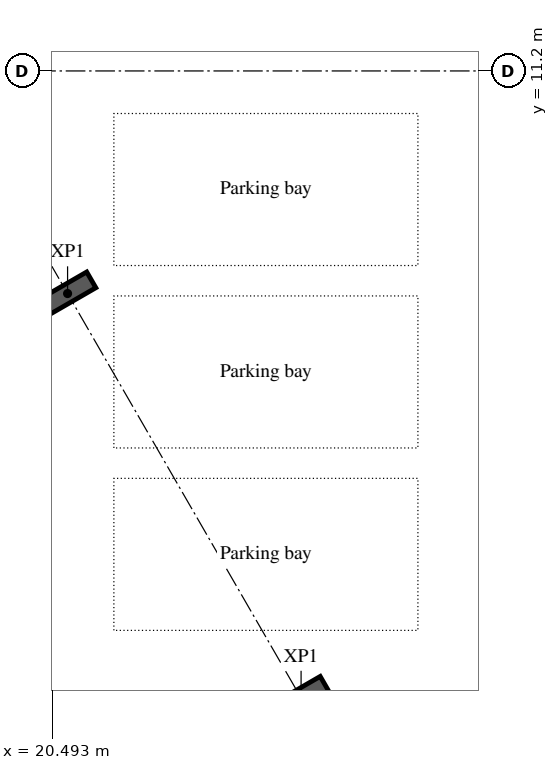
"""IFC4 building model, lengths in metres.
Left out: names, types, materials, properties, quantities, classifications, styles, units other than length and angle.
Written with IfcOpenShell. Run it as: python <this file> out.ifc"""

import sys

from ifc_helpers import new_model, si_unit, direction, frame, origin, origin_2d, place, context, subcontext, project, spatial, i_section, extrude, element, save


model = new_model("IFC4")
c1 = context("Model", 3, precision=1e-05, world=origin(), true_north=direction((0.0, 1.0)))
c2 = subcontext(c1, "Body", "Model", "MODEL_VIEW")
j1 = project(units=[si_unit("LENGTHUNIT", "METRE"), si_unit("PLANEANGLEUNIT", "RADIAN")], contexts=[c1])
p1 = place(None, origin())
s1 = spatial("IfcSite", under=j1, at=p1, CompositionType="ELEMENT")
p2 = place(p1, origin())
s2 = spatial("IfcBuilding", under=s1, at=p2, CompositionType="ELEMENT")
p3 = place(p2, frame((0.0, 0.0, -4.2)))
s3 = spatial("IfcBuildingStorey", under=s2, at=p3, CompositionType="ELEMENT", Elevation=-4.2)
for number, where, z_axis, x_axis in (
    (1, (24.579, 0.888, -0.38), (0.0, 0.0, 1.0), (0.5, -0.866, 0.0)),
    (2, (20.739, 7.539, -0.38), (0.0, 0.0, 1.0), (0.5, -0.866, 0.0)),
):
    element("IfcColumn", number, at=place(p3, frame(where, z_axis=z_axis, x_axis=x_axis)), inside=s3, PredefinedType="COLUMN", context=c2, shape_type="SweptSolid", body=[
        extrude(i_section(OverallWidth=0.3, OverallDepth=0.9, WebThickness=0.019, FlangeThickness=0.035, FilletRadius=0.03, at=origin_2d()), origin(), (0.0, 0.0, 1.0), 4.16),
    ])
save(model, sys.argv[1])
